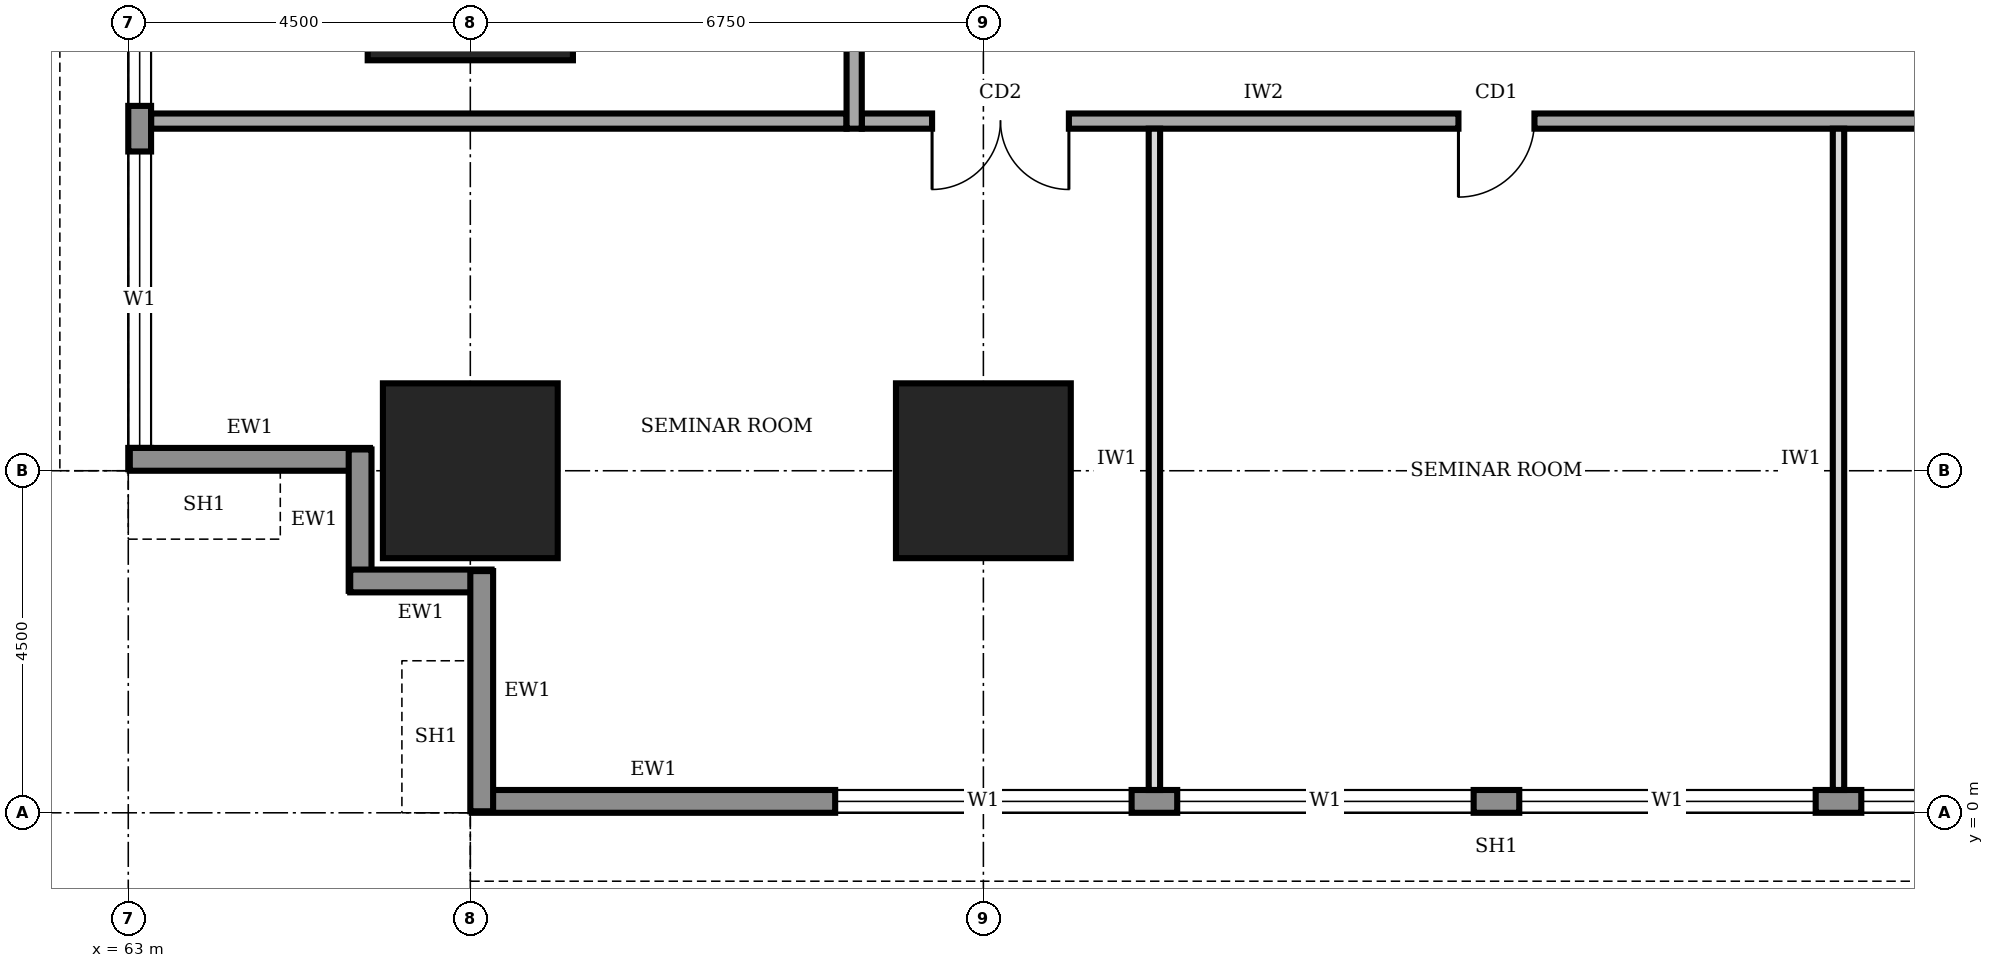
"""IFC4 building model, lengths in metres.
Left out: names, types, materials, properties, quantities, classifications, styles, units other than length and angle.
Written with IfcOpenShell. Run it as: python <this file> out.ifc"""

import sys

from ifc_helpers import new_model, si_unit, direction, frame, frame_2d, origin, origin_2d, place, context, subcontext, project, spatial, rectangle, extrude, element, fill, save


model = new_model("IFC4")
c1 = context("Model", 3, precision=1e-05, world=origin(), true_north=direction((0.0, 1.0)))
c2 = subcontext(c1, "Body", "Model", "MODEL_VIEW")
j1 = project(units=[si_unit("LENGTHUNIT", "METRE"), si_unit("PLANEANGLEUNIT", "RADIAN")], contexts=[c1])
p1 = place(None, origin())
s1 = spatial("IfcSite", under=j1, at=p1, CompositionType="ELEMENT")
p2 = place(p1, origin())
s2 = spatial("IfcBuilding", under=s1, at=p2, CompositionType="ELEMENT")
p3 = place(p2, frame((0.0, 0.0, 33.0)))
s3 = spatial("IfcBuildingStorey", under=s2, at=p3, CompositionType="ELEMENT", Elevation=33.0)
for number, where, z_axis, x_axis in (
    (1, (67.5, 4.5, 0.0), (0.0, 0.0, 1.0), (1.0, 0.0, 0.0)),
    (2, (74.25, 4.5, 0.0), (0.0, 0.0, 1.0), (1.0, 0.0, 0.0)),
):
    element("IfcColumn", number, at=place(p3, frame(where, z_axis=z_axis, x_axis=x_axis)), inside=s3, PredefinedType="COLUMN", context=c2, shape_type="SweptSolid", body=[
        extrude(rectangle(XDim=2.3, YDim=2.3, at=origin_2d()), origin(), (0.0, 0.0, 1.0), 4.0),
    ])
p4 = place(p3, frame((67.5, 11.25, 0.0), z_axis=(0.0, 0.0, 1.0), x_axis=(1.0, 0.0, 0.0)))
e3 = element("IfcColumn", 3, at=p4, inside=s3, PredefinedType="COLUMN", context=c2, shape_type="SweptSolid", body=[
    extrude(rectangle(XDim=2.7, YDim=2.7, at=origin_2d()), origin(), (0.0, 0.0, 1.0), 4.0),
])
p5 = place(p3, frame((67.52, 0.15, 0.0), z_axis=(0.0, 0.0, 1.0), x_axis=(1.0, 0.0, 0.0)))
e4 = element("IfcWall", 4, at=p5, inside=s3, PredefinedType="STANDARD", context=c2, shape_type="SweptSolid", body=[
    extrude(rectangle(XDim=26.96, YDim=0.3, at=frame_2d((13.48, 0.0))), origin(), (0.0, 0.0, 1.0), 3.75),
])
p6 = place(p5, frame((4.78, 0.0, 0.9)))
e5 = element("IfcOpeningElement", 5, at=p6, cuts=e4, PredefinedType="OPENING", context=c2, shape_type="SweptSolid", body=[
    extrude(rectangle(XDim=3.9, YDim=2.2, at=frame_2d((1.95, 1.1))), frame((0.0, 0.16, 0.0), z_axis=(0.0, -1.0, 0.0), x_axis=(1.0, 0.0, 0.0)), (0.0, 0.0, 1.0), 0.32),
])
p7 = place(p5, frame((9.28, 0.0, 0.9)))
e6 = element("IfcOpeningElement", 6, at=p7, cuts=e4, PredefinedType="OPENING", context=c2, shape_type="SweptSolid", body=[
    extrude(rectangle(XDim=3.9, YDim=2.2, at=frame_2d((1.95, 1.1))), frame((0.0, 0.16, 0.0), z_axis=(0.0, -1.0, 0.0), x_axis=(1.0, 0.0, 0.0)), (0.0, 0.0, 1.0), 0.32),
])
p8 = place(p5, frame((13.78, 0.0, 0.9)))
e7 = element("IfcOpeningElement", 7, at=p8, cuts=e4, PredefinedType="OPENING", context=c2, shape_type="SweptSolid", body=[
    extrude(rectangle(XDim=3.9, YDim=2.2, at=frame_2d((1.95, 1.1))), frame((0.0, 0.16, 0.0), z_axis=(0.0, -1.0, 0.0), x_axis=(1.0, 0.0, 0.0)), (0.0, 0.0, 1.0), 0.32),
])
p9 = place(p5, frame((18.28, 0.0, 0.9)))
e8 = element("IfcOpeningElement", 8, at=p9, cuts=e4, PredefinedType="OPENING", context=c2, shape_type="SweptSolid", body=[
    extrude(rectangle(XDim=3.9, YDim=2.2, at=frame_2d((1.95, 1.1))), frame((0.0, 0.16, 0.0), z_axis=(0.0, -1.0, 0.0), x_axis=(1.0, 0.0, 0.0)), (0.0, 0.0, 1.0), 0.32),
])
p10 = place(p5, frame((22.78, 0.0, 0.9)))
e9 = element("IfcOpeningElement", 9, at=p10, cuts=e4, PredefinedType="OPENING", context=c2, shape_type="SweptSolid", body=[
    extrude(rectangle(XDim=3.9, YDim=2.2, at=frame_2d((1.95, 1.1))), frame((0.0, 0.16, 0.0), z_axis=(0.0, -1.0, 0.0), x_axis=(1.0, 0.0, 0.0)), (0.0, 0.0, 1.0), 0.32),
])
p11 = place(p3, frame((63.15, 35.98, 0.0), z_axis=(0.0, 0.0, 1.0), x_axis=(0.0, -1.0, 0.0)))
e10 = element("IfcWall", 10, at=p11, inside=s3, PredefinedType="STANDARD", context=c2, shape_type="SweptSolid", body=[
    extrude(rectangle(XDim=31.46, YDim=0.3, at=frame_2d((15.73, 0.0))), origin(), (0.0, 0.0, 1.0), 3.75),
])
p12 = place(p11, frame((27.28, 0.0, 0.9)))
e11 = element("IfcOpeningElement", 11, at=p12, cuts=e10, PredefinedType="OPENING", context=c2, shape_type="SweptSolid", body=[
    extrude(rectangle(XDim=3.9, YDim=2.2, at=frame_2d((1.95, 1.1))), frame((0.0, 0.16, 0.0), z_axis=(0.0, -1.0, 0.0), x_axis=(1.0, 0.0, 0.0)), (0.0, 0.0, 1.0), 0.32),
])
p13 = place(p11, frame((22.78, 0.0, 0.9)))
e12 = element("IfcOpeningElement", 12, at=p13, cuts=e10, PredefinedType="OPENING", context=c2, shape_type="SweptSolid", body=[
    extrude(rectangle(XDim=3.9, YDim=2.2, at=frame_2d((1.95, 1.1))), frame((0.0, 0.16, 0.0), z_axis=(0.0, -1.0, 0.0), x_axis=(1.0, 0.0, 0.0)), (0.0, 0.0, 1.0), 0.32),
])
p14 = place(p11, frame((18.28, 0.0, 0.9)))
e13 = element("IfcOpeningElement", 13, at=p14, cuts=e10, PredefinedType="OPENING", context=c2, shape_type="SweptSolid", body=[
    extrude(rectangle(XDim=3.9, YDim=2.2, at=frame_2d((1.95, 1.1))), frame((0.0, 0.16, 0.0), z_axis=(0.0, -1.0, 0.0), x_axis=(1.0, 0.0, 0.0)), (0.0, 0.0, 1.0), 0.32),
])
p15 = place(p11, frame((13.78, 0.0, 0.9)))
e14 = element("IfcOpeningElement", 14, at=p15, cuts=e10, PredefinedType="OPENING", context=c2, shape_type="SweptSolid", body=[
    extrude(rectangle(XDim=3.9, YDim=2.2, at=frame_2d((1.95, 1.1))), frame((0.0, 0.16, 0.0), z_axis=(0.0, -1.0, 0.0), x_axis=(1.0, 0.0, 0.0)), (0.0, 0.0, 1.0), 0.32),
])
p16 = place(p11, frame((9.28, 0.0, 0.9)))
e15 = element("IfcOpeningElement", 15, at=p16, cuts=e10, PredefinedType="OPENING", context=c2, shape_type="SweptSolid", body=[
    extrude(rectangle(XDim=3.9, YDim=2.2, at=frame_2d((1.95, 1.1))), frame((0.0, 0.16, 0.0), z_axis=(0.0, -1.0, 0.0), x_axis=(1.0, 0.0, 0.0)), (0.0, 0.0, 1.0), 0.32),
])
p17 = place(p11, frame((4.78, 0.0, 0.9)))
e16 = element("IfcOpeningElement", 16, at=p17, cuts=e10, PredefinedType="OPENING", context=c2, shape_type="SweptSolid", body=[
    extrude(rectangle(XDim=3.9, YDim=2.2, at=frame_2d((1.95, 1.1))), frame((0.0, 0.16, 0.0), z_axis=(0.0, -1.0, 0.0), x_axis=(1.0, 0.0, 0.0)), (0.0, 0.0, 1.0), 0.32),
])
p18 = place(p3, frame((63.02, 4.65, 0.0), z_axis=(0.0, 0.0, 1.0), x_axis=(1.0, 0.0, 0.0)))
e17 = element("IfcWall", 17, at=p18, inside=s3, PredefinedType="STANDARD", context=c2, shape_type="SweptSolid", body=[
    extrude(rectangle(XDim=3.16, YDim=0.3, at=frame_2d((1.58, 0.0))), origin(), (0.0, 0.0, 1.0), 2.85),
])
for number, where, z_axis, x_axis in (
    (18, (66.05, 4.78, 0.0), (0.0, 0.0, 1.0), (0.0, -1.0, 0.0)),
    (19, (65.92, 3.05, 0.0), (0.0, 0.0, 1.0), (1.0, 0.0, 0.0)),
):
    element("IfcWall", number, at=place(p3, frame(where, z_axis=z_axis, x_axis=x_axis)), inside=s3, PredefinedType="STANDARD", context=c2, shape_type="SweptSolid", body=[
        extrude(rectangle(XDim=1.86, YDim=0.3, at=frame_2d((0.93, 0.0))), origin(), (0.0, 0.0, 1.0), 3.75),
    ])
p19 = place(p3, frame((67.65, 3.18, 0.0), z_axis=(0.0, 0.0, 1.0), x_axis=(0.0, -1.0, 0.0)))
e20 = element("IfcWall", 20, at=p19, inside=s3, PredefinedType="STANDARD", context=c2, shape_type="SweptSolid", body=[
    extrude(rectangle(XDim=3.16, YDim=0.3, at=frame_2d((1.58, 0.0))), origin(), (0.0, 0.0, 1.0), 2.85),
])
p20 = place(p3, frame((72.65, 9.1, 0.0), z_axis=(0.0, 0.0, 1.0), x_axis=(1.0, 0.0, 0.0)))
e21 = element("IfcWall", 21, at=p20, inside=s3, PredefinedType="SOLIDWALL", context=c2, shape_type="SweptSolid", body=[
    extrude(rectangle(XDim=16.9, YDim=0.2, at=frame_2d((8.45, 0.0))), origin(), (0.0, 0.0, 1.0), 3.75),
])
p21 = place(p20, frame((0.925, 0.0, 0.0)))
e22 = element("IfcOpeningElement", 22, at=p21, cuts=e21, PredefinedType="OPENING", context=c2, shape_type="SweptSolid", body=[
    extrude(rectangle(XDim=1.8, YDim=2.1, at=frame_2d((0.9, 1.05))), frame((0.0, 0.11, 0.0), z_axis=(0.0, -1.0, 0.0), x_axis=(1.0, 0.0, 0.0)), (0.0, 0.0, 1.0), 0.22),
])
p22 = place(p20, frame((7.85, 0.0, 0.0)))
e23 = element("IfcOpeningElement", 23, at=p22, cuts=e21, PredefinedType="OPENING", context=c2, shape_type="SweptSolid", body=[
    extrude(rectangle(XDim=1.0, YDim=2.1, at=frame_2d((0.5, 1.05))), frame((0.0, 0.11, 0.0), z_axis=(0.0, -1.0, 0.0), x_axis=(1.0, 0.0, 0.0)), (0.0, 0.0, 1.0), 0.22),
])
p23 = place(p20, frame((13.975, 0.0, 0.0)))
e24 = element("IfcOpeningElement", 24, at=p23, cuts=e21, PredefinedType="OPENING", context=c2, shape_type="SweptSolid", body=[
    extrude(rectangle(XDim=1.8, YDim=2.1, at=frame_2d((0.9, 1.05))), frame((0.0, 0.11, 0.0), z_axis=(0.0, -1.0, 0.0), x_axis=(1.0, 0.0, 0.0)), (0.0, 0.0, 1.0), 0.22),
])
p24 = place(p3, frame((72.55, 32.8, 0.0), z_axis=(0.0, 0.0, 1.0), x_axis=(0.0, -1.0, 0.0)))
e25 = element("IfcWall", 25, at=p24, inside=s3, PredefinedType="SOLIDWALL", context=c2, shape_type="SweptSolid", body=[
    extrude(rectangle(XDim=23.8, YDim=0.2, at=frame_2d((11.9, 0.0))), origin(), (0.0, 0.0, 1.0), 3.75),
])
p25 = place(p24, frame((21.05, 0.0, 0.0)))
e26 = element("IfcOpeningElement", 26, at=p25, cuts=e25, PredefinedType="OPENING", context=c2, shape_type="SweptSolid", body=[
    extrude(rectangle(XDim=1.0, YDim=2.1, at=frame_2d((0.5, 1.05))), frame((0.0, 0.11, 0.0), z_axis=(0.0, -1.0, 0.0), x_axis=(1.0, 0.0, 0.0)), (0.0, 0.0, 1.0), 0.22),
])
p26 = place(p24, frame((16.55, 0.0, 0.0)))
e27 = element("IfcOpeningElement", 27, at=p26, cuts=e25, PredefinedType="OPENING", context=c2, shape_type="SweptSolid", body=[
    extrude(rectangle(XDim=1.0, YDim=2.1, at=frame_2d((0.5, 1.05))), frame((0.0, 0.11, 0.0), z_axis=(0.0, -1.0, 0.0), x_axis=(1.0, 0.0, 0.0)), (0.0, 0.0, 1.0), 0.22),
])
p27 = place(p24, frame((12.05, 0.0, 0.0)))
e28 = element("IfcOpeningElement", 28, at=p27, cuts=e25, PredefinedType="OPENING", context=c2, shape_type="SweptSolid", body=[
    extrude(rectangle(XDim=1.0, YDim=2.1, at=frame_2d((0.5, 1.05))), frame((0.0, 0.11, 0.0), z_axis=(0.0, -1.0, 0.0), x_axis=(1.0, 0.0, 0.0)), (0.0, 0.0, 1.0), 0.22),
])
p28 = place(p24, frame((7.55, 0.0, 0.0)))
e29 = element("IfcOpeningElement", 29, at=p28, cuts=e25, PredefinedType="OPENING", context=c2, shape_type="SweptSolid", body=[
    extrude(rectangle(XDim=1.0, YDim=2.1, at=frame_2d((0.5, 1.05))), frame((0.0, 0.11, 0.0), z_axis=(0.0, -1.0, 0.0), x_axis=(1.0, 0.0, 0.0)), (0.0, 0.0, 1.0), 0.22),
])
p29 = place(p24, frame((2.3, 0.0, 0.0)))
e30 = element("IfcOpeningElement", 30, at=p29, cuts=e25, PredefinedType="OPENING", context=c2, shape_type="SweptSolid", body=[
    extrude(rectangle(XDim=1.0, YDim=2.1, at=frame_2d((0.5, 1.05))), frame((0.0, 0.11, 0.0), z_axis=(0.0, -1.0, 0.0), x_axis=(1.0, 0.0, 0.0)), (0.0, 0.0, 1.0), 0.22),
])
p30 = place(p3, frame((63.3, 9.1, 0.0), z_axis=(0.0, 0.0, 1.0), x_axis=(1.0, 0.0, 0.0)))
e31 = element("IfcWall", 31, at=p30, inside=s3, PredefinedType="SOLIDWALL", context=c2, shape_type="SweptSolid", body=[
    extrude(rectangle(XDim=9.15, YDim=0.2, at=frame_2d((4.575, 0.0))), origin(), (0.0, 0.0, 1.0), 3.75),
])
for number, where, z_axis, x_axis in (
    (32, (76.5, 0.3, 0.0), (0.0, 0.0, 1.0), (0.0, 1.0, 0.0)),
    (33, (85.5, 0.3, 0.0), (0.0, 0.0, 1.0), (0.0, 1.0, 0.0)),
):
    element("IfcWall", number, at=place(p3, frame(where, z_axis=z_axis, x_axis=x_axis)), inside=s3, PredefinedType="PARTITIONING", context=c2, shape_type="SweptSolid", body=[
        extrude(rectangle(XDim=8.7, YDim=0.15, at=frame_2d((4.35, 0.0))), origin(), (0.0, 0.0, 1.0), 3.75),
    ])
p31 = place(p6, origin())
e34 = element("IfcWindow", 34, at=p31, inside=s3, PartitioningType="SINGLE_PANEL", PredefinedType="WINDOW", context=c2, shape_type="SweptSolid", body=[
    extrude(rectangle(XDim=3.9, YDim=2.2, at=frame_2d((1.95, 1.1))), frame((0.0, 0.03, 0.0), z_axis=(0.0, -1.0, 0.0), x_axis=(1.0, 0.0, 0.0)), (0.0, 0.0, 1.0), 0.06),
])
fill(e5, e34)
p32 = place(p7, origin())
e35 = element("IfcWindow", 35, at=p32, inside=s3, PartitioningType="SINGLE_PANEL", PredefinedType="WINDOW", context=c2, shape_type="SweptSolid", body=[
    extrude(rectangle(XDim=3.9, YDim=2.2, at=frame_2d((1.95, 1.1))), frame((0.0, 0.03, 0.0), z_axis=(0.0, -1.0, 0.0), x_axis=(1.0, 0.0, 0.0)), (0.0, 0.0, 1.0), 0.06),
])
fill(e6, e35)
p33 = place(p8, origin())
e36 = element("IfcWindow", 36, at=p33, inside=s3, PartitioningType="SINGLE_PANEL", PredefinedType="WINDOW", context=c2, shape_type="SweptSolid", body=[
    extrude(rectangle(XDim=3.9, YDim=2.2, at=frame_2d((1.95, 1.1))), frame((0.0, 0.03, 0.0), z_axis=(0.0, -1.0, 0.0), x_axis=(1.0, 0.0, 0.0)), (0.0, 0.0, 1.0), 0.06),
])
fill(e7, e36)
p34 = place(p9, origin())
e37 = element("IfcWindow", 37, at=p34, inside=s3, PartitioningType="SINGLE_PANEL", PredefinedType="WINDOW", context=c2, shape_type="SweptSolid", body=[
    extrude(rectangle(XDim=3.9, YDim=2.2, at=frame_2d((1.95, 1.1))), frame((0.0, 0.03, 0.0), z_axis=(0.0, -1.0, 0.0), x_axis=(1.0, 0.0, 0.0)), (0.0, 0.0, 1.0), 0.06),
])
fill(e8, e37)
p35 = place(p12, origin())
e38 = element("IfcWindow", 38, at=p35, inside=s3, PartitioningType="SINGLE_PANEL", PredefinedType="WINDOW", context=c2, shape_type="SweptSolid", body=[
    extrude(rectangle(XDim=3.9, YDim=2.2, at=frame_2d((1.95, 1.1))), frame((0.0, 0.03, 0.0), z_axis=(0.0, -1.0, 0.0), x_axis=(1.0, 0.0, 0.0)), (0.0, 0.0, 1.0), 0.06),
])
fill(e11, e38)
p36 = place(p13, origin())
e39 = element("IfcWindow", 39, at=p36, inside=s3, PartitioningType="SINGLE_PANEL", PredefinedType="WINDOW", context=c2, shape_type="SweptSolid", body=[
    extrude(rectangle(XDim=3.9, YDim=2.2, at=frame_2d((1.95, 1.1))), frame((0.0, 0.03, 0.0), z_axis=(0.0, -1.0, 0.0), x_axis=(1.0, 0.0, 0.0)), (0.0, 0.0, 1.0), 0.06),
])
fill(e12, e39)
p37 = place(p21, frame((1.8, 0.0, 0.0), z_axis=(0.0, 0.0, 1.0), x_axis=(-1.0, 0.0, 0.0)))
e40 = element("IfcDoor", 40, at=p37, inside=s3, OperationType="DOUBLE_DOOR_SINGLE_SWING", PredefinedType="DOOR", context=c2, shape_type="SweptSolid", body=[
    extrude(rectangle(XDim=1.8, YDim=2.1, at=frame_2d((0.9, 1.05))), frame((0.0, 0.025, 0.0), z_axis=(0.0, -1.0, 0.0), x_axis=(1.0, 0.0, 0.0)), (0.0, 0.0, 1.0), 0.05),
])
fill(e22, e40)
p38 = place(p22, frame((1.0, 0.0, 0.0), z_axis=(0.0, 0.0, 1.0), x_axis=(-1.0, 0.0, 0.0)))
e41 = element("IfcDoor", 41, at=p38, inside=s3, OperationType="SINGLE_SWING_RIGHT", PredefinedType="DOOR", context=c2, shape_type="SweptSolid", body=[
    extrude(rectangle(XDim=1.0, YDim=2.1, at=frame_2d((0.5, 1.05))), frame((0.0, 0.025, 0.0), z_axis=(0.0, -1.0, 0.0), x_axis=(1.0, 0.0, 0.0)), (0.0, 0.0, 1.0), 0.05),
])
fill(e23, e41)
save(model, sys.argv[1])
